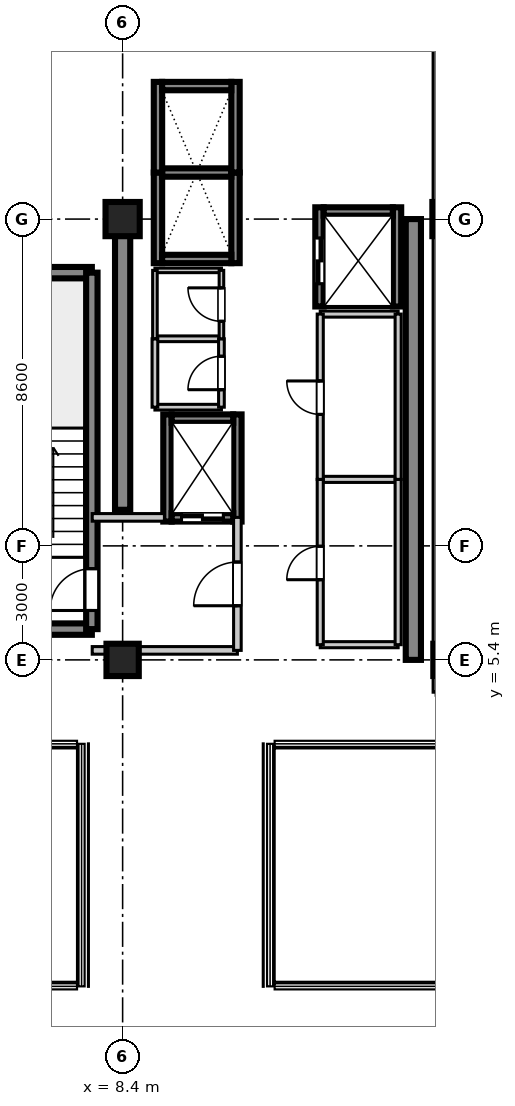
"""IFC4 building model, lengths in metres.
Left out: names, types, materials, properties, quantities, classifications, styles, units other than length and angle.
Written with IfcOpenShell. Run it as: python <this file> out.ifc"""

import sys

from ifc_helpers import new_model, si_unit, direction, frame, frame_2d, origin, origin_2d, place, context, subcontext, project, spatial, rectangle, extrude, source, transform, mapped, element, fill, save


model = new_model("IFC4")
c1 = context("Model", 3, precision=1e-05, world=origin(), true_north=direction((0.0, 1.0)))
c2 = subcontext(c1, "Body", "Model", "MODEL_VIEW")
j1 = project(units=[si_unit("LENGTHUNIT", "METRE"), si_unit("PLANEANGLEUNIT", "RADIAN")], contexts=[c1])
p1 = place(None, origin())
s1 = spatial("IfcSite", under=j1, at=p1, CompositionType="ELEMENT")
p2 = place(p1, origin())
s2 = spatial("IfcBuilding", under=s1, at=p2, CompositionType="ELEMENT")
p3 = place(p2, frame((0.0, 0.0, 288.8)))
s3 = spatial("IfcBuildingStorey", under=s2, at=p3, CompositionType="ELEMENT", Elevation=288.8)
m1 = source(origin(), c2, "Body", "SweptSolid", [
    extrude(rectangle(XDim=0.85, YDim=0.85, at=origin_2d()), origin(), (0.0, 0.0, 1.0), 3.805),
])
p4 = place(p3, frame((8.4, 5.4, 0.0), z_axis=(0.0, 0.0, 1.0), x_axis=(1.0, 0.0, 0.0)))
e1 = element("IfcColumn", 1, at=p4, inside=s3, PredefinedType="PILASTER", context=c2, shape_type="MappedRepresentation", body=[
    mapped(m1, transform((0.0, 0.0, 0.0), scale=1.0)),
])
m2 = source(origin(), c2, "Body", "SweptSolid", [
    extrude(rectangle(XDim=0.9, YDim=0.9, at=origin_2d()), origin(), (0.0, 0.0, 1.0), 3.805),
])
p5 = place(p3, frame((8.4, 17.0, 0.0), z_axis=(0.0, 0.0, 1.0), x_axis=(1.0, 0.0, 0.0)))
e2 = element("IfcColumn", 2, at=p5, inside=s3, PredefinedType="COLUMN", context=c2, shape_type="MappedRepresentation", body=[
    mapped(m2, transform((0.0, 0.0, 0.0), scale=1.0)),
])
p6 = place(p3, frame((17.0, 5.4, 0.0), z_axis=(0.0, 0.0, 1.0), x_axis=(1.0, 0.0, 0.0)))
e3 = element("IfcColumn", 3, at=p6, inside=s3, PredefinedType="PILASTER", context=c2, shape_type="MappedRepresentation", body=[
    mapped(m1, transform((0.0, 0.0, 0.0), scale=1.0)),
])
p7 = place(p3, frame((17.0, 17.0, 0.0), z_axis=(0.0, 0.0, 1.0), x_axis=(1.0, 0.0, 0.0)))
e4 = element("IfcColumn", 4, at=p7, inside=s3, PredefinedType="COLUMN", context=c2, shape_type="MappedRepresentation", body=[
    mapped(m2, transform((0.0, 0.0, 0.0), scale=1.0)),
])
m3 = source(origin(), c2, "Body", "SweptSolid", [
    extrude(rectangle(XDim=7.65, YDim=0.4, at=frame_2d((3.825, 0.0))), origin(), (0.0, 0.0, 1.0), 3.55),
])
p8 = place(p3, frame((8.4, 9.35, 0.0), z_axis=(0.0, 0.0, 1.0), x_axis=(0.0, 1.0, 0.0)))
e5 = element("IfcWall", 5, at=p8, inside=s3, PredefinedType="SHEAR", context=c2, shape_type="MappedRepresentation", body=[
    mapped(m3, transform((0.0, 0.0, 0.0), scale=1.0)),
])
m4 = source(origin(), c2, "Body", "SweptSolid", [
    extrude(rectangle(XDim=11.6, YDim=0.4, at=frame_2d((5.8, 0.0))), origin(), (0.0, 0.0, 1.0), 3.55),
])
p9 = place(p3, frame((16.05, 5.4, 0.0), z_axis=(0.0, 0.0, 1.0), x_axis=(0.0, 1.0, 0.0)))
e6 = element("IfcWall", 6, at=p9, inside=s3, PredefinedType="SHEAR", context=c2, shape_type="MappedRepresentation", body=[
    mapped(m4, transform((0.0, 0.0, 0.0), scale=1.0)),
])
m5 = source(origin(), c2, "Body", "SweptSolid", [
    extrude(rectangle(XDim=3.98, YDim=0.3, at=frame_2d((1.99, 0.0))), origin(), (0.0, 0.0, 1.0), 3.55),
])
for number, where, z_axis, x_axis in (
    (7, (3.61, 6.21, 0.0), (0.0, 0.0, 1.0), (1.0, 0.0, 0.0)),
    (8, (3.61, 15.59, 0.0), (0.0, 0.0, 1.0), (1.0, 0.0, 0.0)),
):
    element("IfcWall", number, at=place(p3, frame(where, z_axis=z_axis, x_axis=x_axis)), inside=s3, PredefinedType="SHEAR", context=c2, shape_type="MappedRepresentation", body=[
        mapped(m5, transform((0.0, 0.0, 0.0), scale=1.0)),
    ])
m6 = source(origin(), c2, "Body", "SweptSolid", [
    extrude(rectangle(XDim=9.38, YDim=0.3, at=frame_2d((4.69, 0.0))), origin(), (0.0, 0.0, 1.0), 3.55),
])
p10 = place(p3, frame((7.59, 6.21, 0.0), z_axis=(0.0, 0.0, 1.0), x_axis=(0.0, 1.0, 0.0)))
e9 = element("IfcWall", 9, at=p10, inside=s3, PredefinedType="SHEAR", context=c2, shape_type="MappedRepresentation", body=[
    mapped(m6, transform((0.0, 0.0, 0.0), scale=1.0)),
])
p11 = place(p10, frame((0.49, 0.0, 0.0)))
e10 = element("IfcOpeningElement", 10, at=p11, cuts=e9, PredefinedType="OPENING", context=c2, shape_type="SweptSolid", body=[
    extrude(rectangle(XDim=1.1, YDim=2.15, at=frame_2d((0.55, 1.075))), frame((0.0, 0.16, 0.0), z_axis=(0.0, -1.0, 0.0), x_axis=(1.0, 0.0, 0.0)), (0.0, 0.0, 1.0), 0.32),
])
m7 = source(origin(), c2, "Body", "SweptSolid", [
    extrude(rectangle(XDim=2.385, YDim=0.22, at=frame_2d((1.192, 0.0))), origin(), (0.0, 0.0, 1.0), 3.55),
])
for number, where, z_axis, x_axis in (
    (11, (9.33, 15.84, 0.0), (0.0, 0.0, 1.0), (0.0, 1.0, 0.0)),
    (12, (11.37, 15.84, 0.0), (0.0, 0.0, 1.0), (0.0, 1.0, 0.0)),
):
    element("IfcWall", number, at=place(p3, frame(where, z_axis=z_axis, x_axis=x_axis)), inside=s3, PredefinedType="SHEAR", context=c2, shape_type="MappedRepresentation", body=[
        mapped(m7, transform((0.0, 0.0, 0.0), scale=1.0)),
    ])
m8 = source(origin(), c2, "Body", "SweptSolid", [
    extrude(rectangle(XDim=1.82, YDim=0.22, at=frame_2d((0.91, 0.0))), origin(), (0.0, 0.0, 1.0), 3.55),
])
p12 = place(p3, frame((9.44, 15.95, 0.0), z_axis=(0.0, 0.0, 1.0), x_axis=(1.0, 0.0, 0.0)))
e13 = element("IfcWall", 13, at=p12, inside=s3, PredefinedType="SHEAR", context=c2, shape_type="MappedRepresentation", body=[
    mapped(m8, transform((0.0, 0.0, 0.0), scale=1.0)),
])
m9 = source(origin(), c2, "Body", "SweptSolid", [
    extrude(rectangle(XDim=1.82, YDim=0.22, at=frame_2d((0.91, 0.0))), origin(), (0.0, 0.0, 1.0), 3.85),
])
p13 = place(p3, frame((9.44, 18.225, 0.0), z_axis=(0.0, 0.0, 1.0), x_axis=(1.0, 0.0, 0.0)))
e14 = element("IfcWall", 14, at=p13, inside=s3, PredefinedType="SHEAR", context=c2, shape_type="MappedRepresentation", body=[
    mapped(m9, transform((0.0, 0.0, 0.0), scale=1.0)),
])
for number, where, z_axis, x_axis in (
    (15, (9.33, 18.225, 0.0), (0.0, 0.0, 1.0), (0.0, 1.0, 0.0)),
    (16, (11.37, 18.225, 0.0), (0.0, 0.0, 1.0), (0.0, 1.0, 0.0)),
):
    element("IfcWall", number, at=place(p3, frame(where, z_axis=z_axis, x_axis=x_axis)), inside=s3, PredefinedType="SHEAR", context=c2, shape_type="MappedRepresentation", body=[
        mapped(m7, transform((0.0, 0.0, 0.0), scale=1.0)),
    ])
p14 = place(p3, frame((9.44, 20.5, 0.0), z_axis=(0.0, 0.0, 1.0), x_axis=(1.0, 0.0, 0.0)))
e17 = element("IfcWall", 17, at=p14, inside=s3, PredefinedType="SHEAR", context=c2, shape_type="MappedRepresentation", body=[
    mapped(m8, transform((0.0, 0.0, 0.0), scale=1.0)),
])
m10 = source(origin(), c2, "Body", "SweptSolid", [
    extrude(rectangle(XDim=2.82, YDim=0.22, at=frame_2d((1.41, 0.0))), origin(), (0.0, 0.0, 1.0), 3.55),
])
for number, where, z_axis, x_axis in (
    (18, (9.58, 9.04, 0.0), (0.0, 0.0, 1.0), (0.0, 1.0, 0.0)),
    (19, (11.42, 9.04, 0.0), (0.0, 0.0, 1.0), (0.0, 1.0, 0.0)),
):
    element("IfcWall", number, at=place(p3, frame(where, z_axis=z_axis, x_axis=x_axis)), inside=s3, PredefinedType="SHEAR", context=c2, shape_type="MappedRepresentation", body=[
        mapped(m10, transform((0.0, 0.0, 0.0), scale=1.0)),
    ])
m11 = source(origin(), c2, "Body", "SweptSolid", [
    extrude(rectangle(XDim=1.62, YDim=0.22, at=frame_2d((0.81, 0.0))), origin(), (0.0, 0.0, 1.0), 3.55),
])
p15 = place(p3, frame((9.69, 9.15, 0.0), z_axis=(0.0, 0.0, 1.0), x_axis=(1.0, 0.0, 0.0)))
e20 = element("IfcWall", 20, at=p15, inside=s3, PredefinedType="SHEAR", context=c2, shape_type="MappedRepresentation", body=[
    mapped(m11, transform((0.0, 0.0, 0.0), scale=1.0)),
])
p16 = place(p15, frame((0.26, 0.0, 0.0)))
e21 = element("IfcOpeningElement", 21, at=p16, cuts=e20, PredefinedType="OPENING", context=c2, shape_type="SweptSolid", body=[
    extrude(rectangle(XDim=1.1, YDim=2.2, at=frame_2d((0.55, 1.1))), frame((0.0, 0.12, 0.0), z_axis=(0.0, -1.0, 0.0), x_axis=(1.0, 0.0, 0.0)), (0.0, 0.0, 1.0), 0.24),
])
p17 = place(p3, frame((9.69, 11.75, 0.0), z_axis=(0.0, 0.0, 1.0), x_axis=(1.0, 0.0, 0.0)))
e22 = element("IfcWall", 22, at=p17, inside=s3, PredefinedType="SHEAR", context=c2, shape_type="MappedRepresentation", body=[
    mapped(m11, transform((0.0, 0.0, 0.0), scale=1.0)),
])
m12 = source(origin(), c2, "Body", "SweptSolid", [
    extrude(rectangle(XDim=2.61, YDim=0.22, at=frame_2d((1.305, 0.0))), origin(), (0.0, 0.0, 1.0), 3.55),
])
p18 = place(p3, frame((13.58, 14.7, 0.0), z_axis=(0.0, 0.0, 1.0), x_axis=(0.0, 1.0, 0.0)))
e23 = element("IfcWall", 23, at=p18, inside=s3, PredefinedType="SHEAR", context=c2, shape_type="MappedRepresentation", body=[
    mapped(m12, transform((0.0, 0.0, 0.0), scale=1.0)),
])
p19 = place(p18, frame((0.6, 0.0, 0.0)))
e24 = element("IfcOpeningElement", 24, at=p19, cuts=e23, PredefinedType="OPENING", context=c2, shape_type="SweptSolid", body=[
    extrude(rectangle(XDim=1.2, YDim=2.2, at=frame_2d((0.6, 1.1))), frame((0.0, 0.12, 0.0), z_axis=(0.0, -1.0, 0.0), x_axis=(1.0, 0.0, 0.0)), (0.0, 0.0, 1.0), 0.24),
])
p20 = place(p3, frame((15.62, 14.7, 0.0), z_axis=(0.0, 0.0, 1.0), x_axis=(0.0, 1.0, 0.0)))
e25 = element("IfcWall", 25, at=p20, inside=s3, PredefinedType="SHEAR", context=c2, shape_type="MappedRepresentation", body=[
    mapped(m12, transform((0.0, 0.0, 0.0), scale=1.0)),
])
p21 = place(p3, frame((13.69, 17.2, 0.0), z_axis=(0.0, 0.0, 1.0), x_axis=(1.0, 0.0, 0.0)))
e26 = element("IfcWall", 26, at=p21, inside=s3, PredefinedType="SHEAR", context=c2, shape_type="MappedRepresentation", body=[
    mapped(m8, transform((0.0, 0.0, 0.0), scale=1.0)),
])
m13 = source(origin(), c2, "Body", "SweptSolid", [
    extrude(rectangle(XDim=3.82, YDim=0.2, at=frame_2d((1.91, 0.0))), origin(), (0.0, 0.0, 1.0), 2.89),
])
p22 = place(p3, frame((7.6, 5.65, 0.0), z_axis=(0.0, 0.0, 1.0), x_axis=(1.0, 0.0, 0.0)))
e27 = element("IfcWall", 27, at=p22, inside=s3, PredefinedType="PARTITIONING", context=c2, shape_type="MappedRepresentation", body=[
    mapped(m13, transform((0.0, 0.0, 0.0), scale=1.0)),
])
m14 = source(origin(), c2, "Body", "SweptSolid", [
    extrude(rectangle(XDim=1.9, YDim=0.2, at=frame_2d((0.95, 0.0))), origin(), (0.0, 0.0, 1.0), 2.89),
])
p23 = place(p3, frame((7.6, 9.15, 0.0), z_axis=(0.0, 0.0, 1.0), x_axis=(1.0, 0.0, 0.0)))
e28 = element("IfcWall", 28, at=p23, inside=s3, PredefinedType="PARTITIONING", context=c2, shape_type="MappedRepresentation", body=[
    mapped(m14, transform((0.0, 0.0, 0.0), scale=1.0)),
])
m15 = source(origin(), c2, "Body", "SweptSolid", [
    extrude(rectangle(XDim=3.5, YDim=0.2, at=frame_2d((1.75, 0.0))), origin(), (0.0, 0.0, 1.0), 2.89),
])
p24 = place(p3, frame((11.42, 5.65, 0.0), z_axis=(0.0, 0.0, 1.0), x_axis=(0.0, 1.0, 0.0)))
e29 = element("IfcWall", 29, at=p24, inside=s3, PredefinedType="PARTITIONING", context=c2, shape_type="MappedRepresentation", body=[
    mapped(m15, transform((0.0, 0.0, 0.0), scale=1.0)),
])
p25 = place(p24, frame((1.175, 0.0, 0.0)))
e30 = element("IfcOpeningElement", 30, at=p25, cuts=e29, PredefinedType="OPENING", context=c2, shape_type="SweptSolid", body=[
    extrude(rectangle(XDim=1.15, YDim=2.15, at=frame_2d((0.575, 1.075))), frame((0.0, 0.11, 0.0), z_axis=(0.0, -1.0, 0.0), x_axis=(1.0, 0.0, 0.0)), (0.0, 0.0, 1.0), 0.22),
])
m16 = source(origin(), c2, "Body", "SweptSolid", [
    extrude(rectangle(XDim=1.75, YDim=0.15, at=frame_2d((0.875, 0.0))), origin(), (0.0, 0.0, 1.0), 2.89),
])
for number, where, z_axis, x_axis in (
    (31, (9.25, 12.05, 0.0), (0.0, 0.0, 1.0), (1.0, 0.0, 0.0)),
    (32, (9.25, 13.85, 0.0), (0.0, 0.0, 1.0), (1.0, 0.0, 0.0)),
):
    element("IfcWall", number, at=place(p3, frame(where, z_axis=z_axis, x_axis=x_axis)), inside=s3, PredefinedType="PARTITIONING", context=c2, shape_type="MappedRepresentation", body=[
        mapped(m16, transform((0.0, 0.0, 0.0), scale=1.0)),
    ])
m17 = source(origin(), c2, "Body", "SweptSolid", [
    extrude(rectangle(XDim=1.8, YDim=0.15, at=frame_2d((0.9, 0.0))), origin(), (0.0, 0.0, 1.0), 2.89),
])
p26 = place(p3, frame((9.25, 12.05, 0.0), z_axis=(0.0, 0.0, 1.0), x_axis=(0.0, 1.0, 0.0)))
e33 = element("IfcWall", 33, at=p26, inside=s3, PredefinedType="PARTITIONING", context=c2, shape_type="MappedRepresentation", body=[
    mapped(m17, transform((0.0, 0.0, 0.0), scale=1.0)),
])
p27 = place(p3, frame((11.0, 12.05, 0.0), z_axis=(0.0, 0.0, 1.0), x_axis=(0.0, 1.0, 0.0)))
e34 = element("IfcWall", 34, at=p27, inside=s3, PredefinedType="PARTITIONING", context=c2, shape_type="MappedRepresentation", body=[
    mapped(m17, transform((0.0, 0.0, 0.0), scale=1.0)),
])
p28 = place(p27, frame((0.46, 0.0, 0.0)))
e35 = element("IfcOpeningElement", 35, at=p28, cuts=e34, PredefinedType="OPENING", context=c2, shape_type="SweptSolid", body=[
    extrude(rectangle(XDim=0.88, YDim=2.1, at=frame_2d((0.44, 1.05))), frame((0.0, 0.085, 0.0), z_axis=(0.0, -1.0, 0.0), x_axis=(1.0, 0.0, 0.0)), (0.0, 0.0, 1.0), 0.17),
])
m18 = source(origin(), c2, "Body", "SweptSolid", [
    extrude(rectangle(XDim=1.75, YDim=0.12, at=frame_2d((0.875, 0.0))), origin(), (0.0, 0.0, 1.0), 2.89),
])
p29 = place(p3, frame((9.25, 15.65, 0.0), z_axis=(0.0, 0.0, 1.0), x_axis=(1.0, 0.0, 0.0)))
e36 = element("IfcWall", 36, at=p29, inside=s3, PredefinedType="PARTITIONING", context=c2, shape_type="MappedRepresentation", body=[
    mapped(m18, transform((0.0, 0.0, 0.0), scale=1.0)),
])
m19 = source(origin(), c2, "Body", "SweptSolid", [
    extrude(rectangle(XDim=1.8, YDim=0.12, at=frame_2d((0.9, 0.0))), origin(), (0.0, 0.0, 1.0), 2.89),
])
p30 = place(p3, frame((9.25, 13.85, 0.0), z_axis=(0.0, 0.0, 1.0), x_axis=(0.0, 1.0, 0.0)))
e37 = element("IfcWall", 37, at=p30, inside=s3, PredefinedType="PARTITIONING", context=c2, shape_type="MappedRepresentation", body=[
    mapped(m19, transform((0.0, 0.0, 0.0), scale=1.0)),
])
p31 = place(p3, frame((11.0, 13.85, 0.0), z_axis=(0.0, 0.0, 1.0), x_axis=(0.0, 1.0, 0.0)))
e38 = element("IfcWall", 38, at=p31, inside=s3, PredefinedType="PARTITIONING", context=c2, shape_type="MappedRepresentation", body=[
    mapped(m19, transform((0.0, 0.0, 0.0), scale=1.0)),
])
p32 = place(p31, frame((0.46, 0.0, 0.0)))
e39 = element("IfcOpeningElement", 39, at=p32, cuts=e38, PredefinedType="OPENING", context=c2, shape_type="SweptSolid", body=[
    extrude(rectangle(XDim=0.88, YDim=2.1, at=frame_2d((0.44, 1.05))), frame((0.0, 0.07, 0.0), z_axis=(0.0, -1.0, 0.0), x_axis=(1.0, 0.0, 0.0)), (0.0, 0.0, 1.0), 0.14),
])
m20 = source(origin(), c2, "Body", "SweptSolid", [
    extrude(rectangle(XDim=2.05, YDim=0.16, at=frame_2d((1.025, 0.0))), origin(), (0.0, 0.0, 1.0), 2.89),
])
for number, where, z_axis, x_axis in (
    (40, (13.6, 5.8, 0.0), (0.0, 0.0, 1.0), (1.0, 0.0, 0.0)),
    (41, (13.6, 10.15, 0.0), (0.0, 0.0, 1.0), (1.0, 0.0, 0.0)),
):
    element("IfcWall", number, at=place(p3, frame(where, z_axis=z_axis, x_axis=x_axis)), inside=s3, PredefinedType="PARTITIONING", context=c2, shape_type="MappedRepresentation", body=[
        mapped(m20, transform((0.0, 0.0, 0.0), scale=1.0)),
    ])
m21 = source(origin(), c2, "Body", "SweptSolid", [
    extrude(rectangle(XDim=4.35, YDim=0.16, at=frame_2d((2.175, 0.0))), origin(), (0.0, 0.0, 1.0), 2.89),
])
p33 = place(p3, frame((13.6, 5.8, 0.0), z_axis=(0.0, 0.0, 1.0), x_axis=(0.0, 1.0, 0.0)))
e42 = element("IfcWall", 42, at=p33, inside=s3, PredefinedType="PARTITIONING", context=c2, shape_type="MappedRepresentation", body=[
    mapped(m21, transform((0.0, 0.0, 0.0), scale=1.0)),
])
p34 = place(p33, frame((1.71, 0.0, 0.0)))
e43 = element("IfcOpeningElement", 43, at=p34, cuts=e42, PredefinedType="OPENING", context=c2, shape_type="SweptSolid", body=[
    extrude(rectangle(XDim=0.88, YDim=2.1, at=frame_2d((0.44, 1.05))), frame((0.0, 0.09, 0.0), z_axis=(0.0, -1.0, 0.0), x_axis=(1.0, 0.0, 0.0)), (0.0, 0.0, 1.0), 0.18),
])
p35 = place(p3, frame((15.65, 5.8, 0.0), z_axis=(0.0, 0.0, 1.0), x_axis=(0.0, 1.0, 0.0)))
e44 = element("IfcWall", 44, at=p35, inside=s3, PredefinedType="PARTITIONING", context=c2, shape_type="MappedRepresentation", body=[
    mapped(m21, transform((0.0, 0.0, 0.0), scale=1.0)),
])
p36 = place(p3, frame((13.6, 14.5, 0.0), z_axis=(0.0, 0.0, 1.0), x_axis=(1.0, 0.0, 0.0)))
e45 = element("IfcWall", 45, at=p36, inside=s3, PredefinedType="PARTITIONING", context=c2, shape_type="MappedRepresentation", body=[
    mapped(m20, transform((0.0, 0.0, 0.0), scale=1.0)),
])
m22 = source(origin(), c2, "Body", "SweptSolid", [
    extrude(rectangle(XDim=4.35, YDim=0.16, at=frame_2d((2.175, 0.0))), origin(), (0.0, 0.0, 1.0), 2.89),
])
p37 = place(p3, frame((13.6, 10.15, 0.0), z_axis=(0.0, 0.0, 1.0), x_axis=(0.0, 1.0, 0.0)))
e46 = element("IfcWall", 46, at=p37, inside=s3, PredefinedType="PARTITIONING", context=c2, shape_type="MappedRepresentation", body=[
    mapped(m22, transform((0.0, 0.0, 0.0), scale=1.0)),
])
p38 = place(p37, frame((1.71, 0.0, 0.0)))
e47 = element("IfcOpeningElement", 47, at=p38, cuts=e46, PredefinedType="OPENING", context=c2, shape_type="SweptSolid", body=[
    extrude(rectangle(XDim=0.88, YDim=2.1, at=frame_2d((0.44, 1.05))), frame((0.0, 0.09, 0.0), z_axis=(0.0, -1.0, 0.0), x_axis=(1.0, 0.0, 0.0)), (0.0, 0.0, 1.0), 0.18),
])
p39 = place(p3, frame((15.65, 10.15, 0.0), z_axis=(0.0, 0.0, 1.0), x_axis=(0.0, 1.0, 0.0)))
e48 = element("IfcWall", 48, at=p39, inside=s3, PredefinedType="PARTITIONING", context=c2, shape_type="MappedRepresentation", body=[
    mapped(m22, transform((0.0, 0.0, 0.0), scale=1.0)),
])
m23 = source(origin(), c2, "Body", "SweptSolid", [
    extrude(rectangle(XDim=17.95, YDim=0.16, at=frame_2d((8.975, 0.0))), origin(), (0.0, 0.0, 1.0), 2.89),
])
p40 = place(p3, frame((16.65, 4.55, 0.0), z_axis=(0.0, 0.0, 1.0), x_axis=(0.0, 1.0, 0.0)))
e49 = element("IfcWall", 49, at=p40, inside=s3, PredefinedType="PARTITIONING", context=c2, shape_type="MappedRepresentation", body=[
    mapped(m23, transform((0.0, 0.0, 0.0), scale=1.0)),
])
m24 = source(origin(), c2, "Body", "SweptSolid", [
    extrude(rectangle(XDim=1.1, YDim=2.15, at=frame_2d((0.55, 1.075))), frame((0.0, 0.025, 0.0), z_axis=(0.0, -1.0, 0.0), x_axis=(1.0, 0.0, 0.0)), (0.0, 0.0, 1.0), 0.05),
])
p41 = place(p11, origin())
e50 = element("IfcDoor", 50, at=p41, inside=s3, OperationType="SINGLE_SWING_LEFT", PredefinedType="DOOR", context=c2, shape_type="MappedRepresentation", body=[
    mapped(m24, transform((0.0, 0.0, 0.0), scale=1.0)),
])
fill(e10, e50)
m25 = source(origin(), c2, "Body", "SweptSolid", [
    extrude(rectangle(XDim=1.1, YDim=2.2, at=frame_2d((0.55, 1.1))), frame((0.0, 0.025, 0.0), z_axis=(0.0, -1.0, 0.0), x_axis=(1.0, 0.0, 0.0)), (0.0, 0.0, 1.0), 0.05),
])
p42 = place(p16, frame((1.1, 0.0, 0.0), z_axis=(0.0, 0.0, 1.0), x_axis=(-1.0, 0.0, 0.0)))
e51 = element("IfcDoor", 51, at=p42, inside=s3, OperationType="DOUBLE_DOOR_SLIDING", PredefinedType="DOOR", context=c2, shape_type="MappedRepresentation", body=[
    mapped(m25, transform((0.0, 0.0, 0.0), scale=1.0)),
])
fill(e21, e51)
m26 = source(origin(), c2, "Body", "SweptSolid", [
    extrude(rectangle(XDim=1.2, YDim=2.2, at=frame_2d((0.6, 1.1))), frame((0.0, 0.025, 0.0), z_axis=(0.0, -1.0, 0.0), x_axis=(1.0, 0.0, 0.0)), (0.0, 0.0, 1.0), 0.05),
])
p43 = place(p19, origin())
e52 = element("IfcDoor", 52, at=p43, inside=s3, OperationType="DOUBLE_DOOR_SLIDING", PredefinedType="DOOR", context=c2, shape_type="MappedRepresentation", body=[
    mapped(m26, transform((0.0, 0.0, 0.0), scale=1.0)),
])
fill(e24, e52)
m27 = source(origin(), c2, "Body", "SweptSolid", [
    extrude(rectangle(XDim=1.15, YDim=2.15, at=frame_2d((0.575, 1.075))), frame((0.0, 0.025, 0.0), z_axis=(0.0, -1.0, 0.0), x_axis=(1.0, 0.0, 0.0)), (0.0, 0.0, 1.0), 0.05),
])
p44 = place(p25, frame((1.15, 0.0, 0.0), z_axis=(0.0, 0.0, 1.0), x_axis=(-1.0, 0.0, 0.0)))
e53 = element("IfcDoor", 53, at=p44, inside=s3, OperationType="SINGLE_SWING_LEFT", PredefinedType="DOOR", context=c2, shape_type="MappedRepresentation", body=[
    mapped(m27, transform((0.0, 0.0, 0.0), scale=1.0)),
])
fill(e30, e53)
m28 = source(origin(), c2, "Body", "SweptSolid", [
    extrude(rectangle(XDim=0.88, YDim=2.1, at=frame_2d((0.44, 1.05))), frame((0.0, 0.025, 0.0), z_axis=(0.0, -1.0, 0.0), x_axis=(1.0, 0.0, 0.0)), (0.0, 0.0, 1.0), 0.05),
])
p45 = place(p28, origin())
e54 = element("IfcDoor", 54, at=p45, inside=s3, OperationType="SINGLE_SWING_LEFT", PredefinedType="DOOR", context=c2, shape_type="MappedRepresentation", body=[
    mapped(m28, transform((0.0, 0.0, 0.0), scale=1.0)),
])
fill(e35, e54)
p46 = place(p32, origin())
e55 = element("IfcDoor", 55, at=p46, inside=s3, OperationType="SINGLE_SWING_RIGHT", PredefinedType="DOOR", context=c2, shape_type="MappedRepresentation", body=[
    mapped(m28, transform((0.0, 0.0, 0.0), scale=1.0)),
])
fill(e39, e55)
p47 = place(p34, frame((0.88, 0.0, 0.0), z_axis=(0.0, 0.0, 1.0), x_axis=(-1.0, 0.0, 0.0)))
e56 = element("IfcDoor", 56, at=p47, inside=s3, OperationType="SINGLE_SWING_LEFT", PredefinedType="DOOR", context=c2, shape_type="MappedRepresentation", body=[
    mapped(m28, transform((0.0, 0.0, 0.0), scale=1.0)),
])
fill(e43, e56)
p48 = place(p38, frame((0.88, 0.0, 0.0), z_axis=(0.0, 0.0, 1.0), x_axis=(-1.0, 0.0, 0.0)))
e57 = element("IfcDoor", 57, at=p48, inside=s3, OperationType="SINGLE_SWING_RIGHT", PredefinedType="DOOR", context=c2, shape_type="MappedRepresentation", body=[
    mapped(m28, transform((0.0, 0.0, 0.0), scale=1.0)),
])
fill(e47, e57)
save(model, sys.argv[1])
